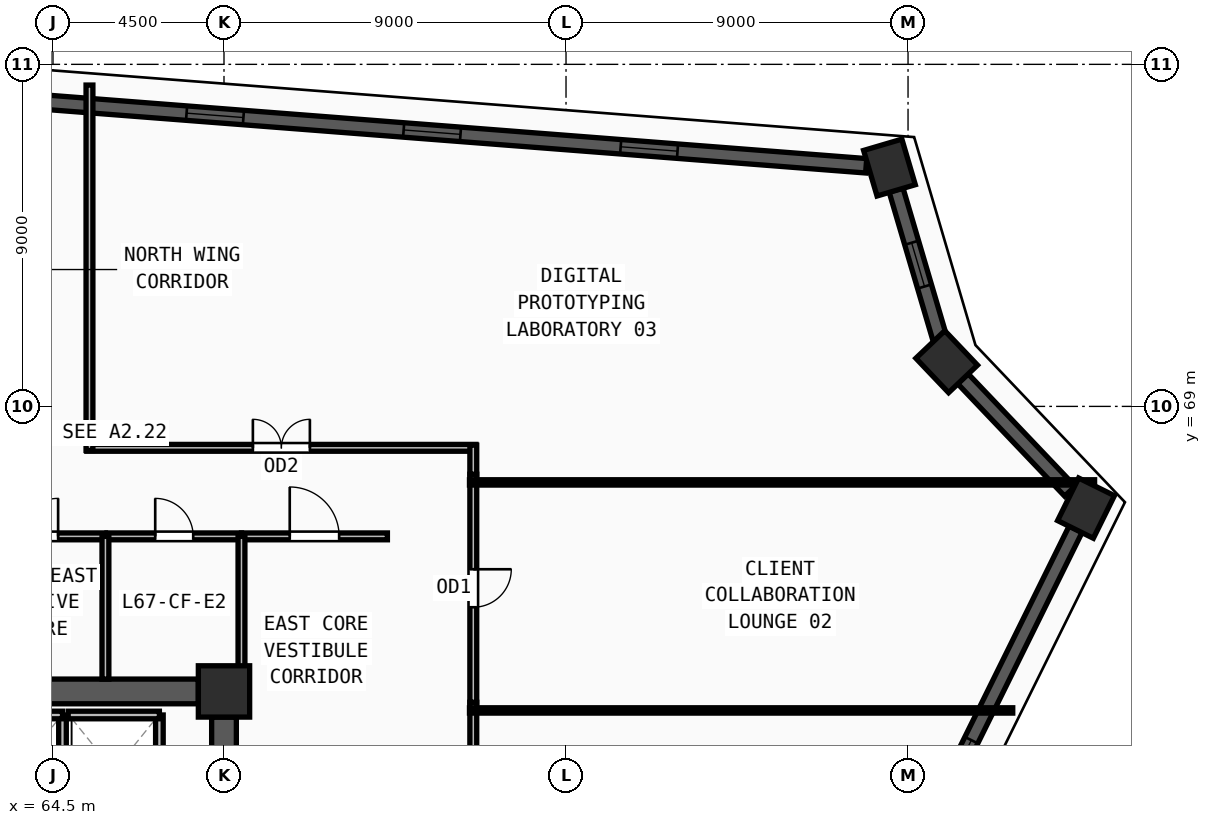
"""IFC4 building model, lengths in metres.
Left out: names, types, materials, properties, quantities, classifications, styles, units other than length and angle.
Written with IfcOpenShell. Run it as: python <this file> out.ifc"""

import sys

from ifc_helpers import new_model, si_unit, direction, frame, frame_2d, origin, origin_2d, place, context, subcontext, project, spatial, rectangle, extrude, source, transform, mapped, element, fill, save


model = new_model("IFC4")
c1 = context("Model", 3, precision=1e-05, world=origin(), true_north=direction((0.0, 1.0)))
c2 = subcontext(c1, "Body", "Model", "MODEL_VIEW")
j1 = project(units=[si_unit("LENGTHUNIT", "METRE"), si_unit("PLANEANGLEUNIT", "RADIAN")], contexts=[c1])
p1 = place(None, origin())
s1 = spatial("IfcSite", under=j1, at=p1, CompositionType="ELEMENT")
p2 = place(p1, origin())
s2 = spatial("IfcBuilding", under=s1, at=p2, CompositionType="ELEMENT")
p3 = place(p2, frame((0.0, 0.0, 258.75)))
s3 = spatial("IfcBuildingStorey", under=s2, at=p3, CompositionType="ELEMENT", Elevation=258.75)
m1 = source(origin(), c2, "Body", "SweptSolid", [
    extrude(rectangle(XDim=1.35, YDim=1.35, at=origin_2d()), origin(), (0.0, 0.0, 1.0), 3.75),
])
p4 = place(p3, frame((69.0, 61.5, 0.0), z_axis=(0.0, 0.0, 1.0), x_axis=(1.0, 0.0, 0.0)))
e1 = element("IfcColumn", 1, at=p4, inside=s3, PredefinedType="COLUMN", context=c2, shape_type="MappedRepresentation", body=[
    mapped(m1, transform((0.0, 0.0, 0.0), x_axis=(1.0, 0.0, 0.0), y_axis=(0.0, 1.0, 0.0), z_axis=(0.0, 0.0, 1.0), scale=1.0)),
])
m2 = source(origin(), c2, "Body", "SweptSolid", [
    extrude(rectangle(XDim=1.25, YDim=1.05, at=origin_2d()), origin(), (0.0, 0.0, 1.0), 3.75),
])
for number, where, z_axis, x_axis in (
    (2, (86.511, 75.284, 0.0), (0.0, 0.0, 1.0), (-0.283, 0.959, 0.0)),
    (3, (88.017, 70.176, 0.0), (0.0, 0.0, 1.0), (-0.689, 0.724, 0.0)),
    (4, (91.683, 66.323, 0.0), (0.0, 0.0, 1.0), (0.443, 0.896, 0.0)),
):
    element("IfcColumn", number, at=place(p3, frame(where, z_axis=z_axis, x_axis=x_axis)), inside=s3, PredefinedType="COLUMN", context=c2, shape_type="MappedRepresentation", body=[
        mapped(m2, transform((0.0, 0.0, 0.0), x_axis=(1.0, 0.0, 0.0), y_axis=(0.0, 1.0, 0.0), z_axis=(0.0, 0.0, 1.0), scale=1.0)),
    ])
p5 = place(p3, frame((79.1, 40.865, 0.0), z_axis=(0.0, 0.0, 1.0), x_axis=(0.44309993188, 0.896472225096, 0.0)))
e5 = element("IfcWall", 5, at=p5, inside=s3, PredefinedType="SOLIDWALL", context=c2, shape_type="SweptSolid", body=[
    extrude(rectangle(XDim=27.783, YDim=0.38, at=frame_2d((13.892, 0.0))), origin(), (0.0, 0.0, 1.0), 3.57),
])
m3 = source(origin(), c2, "Body", "SweptSolid", [
    extrude(rectangle(XDim=1.5, YDim=1.9, at=frame_2d((0.75, 0.95))), frame((0.0, 0.2, 0.0), z_axis=(0.0, -1.0, 0.0), x_axis=(1.0, 0.0, 0.0)), (0.0, 0.0, 1.0), 0.4),
])
p6 = place(p5, frame((6.196, 0.0, 0.55)))
e6 = element("IfcOpeningElement", 6, at=p6, cuts=e5, PredefinedType="OPENING", context=c2, shape_type="MappedRepresentation", body=[
    mapped(m3, transform((0.0, 0.0, 0.0), x_axis=(1.0, 0.0, 0.0), y_axis=(0.0, 1.0, 0.0), z_axis=(0.0, 0.0, 1.0), scale=1.0)),
])
p7 = place(p5, frame((13.992, 0.0, 0.55)))
e7 = element("IfcOpeningElement", 7, at=p7, cuts=e5, PredefinedType="OPENING", context=c2, shape_type="MappedRepresentation", body=[
    mapped(m3, transform((0.0, 0.0, 0.0), x_axis=(1.0, 0.0, 0.0), y_axis=(0.0, 1.0, 0.0), z_axis=(0.0, 0.0, 1.0), scale=1.0)),
])
p8 = place(p5, frame((20.088, 0.0, 0.55)))
e8 = element("IfcOpeningElement", 8, at=p8, cuts=e5, PredefinedType="OPENING", context=c2, shape_type="MappedRepresentation", body=[
    mapped(m3, transform((0.0, 0.0, 0.0), x_axis=(1.0, 0.0, 0.0), y_axis=(0.0, 1.0, 0.0), z_axis=(0.0, 0.0, 1.0), scale=1.0)),
])
p9 = place(p3, frame((91.259, 66.769, 0.0), z_axis=(0.0, 0.0, 1.0), x_axis=(-0.689420989275, 0.724360890404, 0.0)))
e9 = element("IfcWall", 9, at=p9, inside=s3, PredefinedType="SOLIDWALL", context=c2, shape_type="SweptSolid", body=[
    extrude(rectangle(XDim=4.088, YDim=0.38, at=frame_2d((2.044, 0.0))), origin(), (0.0, 0.0, 1.0), 3.57),
])
p10 = place(p3, frame((87.843, 70.766, 0.0), z_axis=(0.0, 0.0, 1.0), x_axis=(-0.282766622506, 0.95918873909, 0.0)))
e10 = element("IfcWall", 10, at=p10, inside=s3, PredefinedType="SOLIDWALL", context=c2, shape_type="SweptSolid", body=[
    extrude(rectangle(XDim=4.095, YDim=0.38, at=frame_2d((2.048, 0.0))), origin(), (0.0, 0.0, 1.0), 3.57),
])
m4 = source(origin(), c2, "Body", "SweptSolid", [
    extrude(rectangle(XDim=1.2, YDim=1.9, at=frame_2d((0.6, 0.95))), frame((0.0, 0.2, 0.0), z_axis=(0.0, -1.0, 0.0), x_axis=(1.0, 0.0, 0.0)), (0.0, 0.0, 1.0), 0.4),
])
p11 = place(p10, frame((1.448, 0.0, 0.55)))
e11 = element("IfcOpeningElement", 11, at=p11, cuts=e10, PredefinedType="OPENING", context=c2, shape_type="MappedRepresentation", body=[
    mapped(m4, transform((0.0, 0.0, 0.0), x_axis=(1.0, 0.0, 0.0), y_axis=(0.0, 1.0, 0.0), z_axis=(0.0, 0.0, 1.0), scale=1.0)),
])
p12 = place(p3, frame((85.898, 75.331, 0.0), z_axis=(0.0, 0.0, 1.0), x_axis=(-0.997012155609, 0.077244815801, 0.0)))
e12 = element("IfcWall", 12, at=p12, inside=s3, PredefinedType="SOLIDWALL", context=c2, shape_type="SweptSolid", body=[
    extrude(rectangle(XDim=22.914, YDim=0.38, at=frame_2d((11.457, 0.0))), origin(), (0.0, 0.0, 1.0), 3.57),
])
p13 = place(p12, frame((4.979, 0.0, 0.55)))
e13 = element("IfcOpeningElement", 13, at=p13, cuts=e12, PredefinedType="OPENING", context=c2, shape_type="MappedRepresentation", body=[
    mapped(m3, transform((0.0, 0.0, 0.0), x_axis=(1.0, 0.0, 0.0), y_axis=(0.0, 1.0, 0.0), z_axis=(0.0, 0.0, 1.0), scale=1.0)),
])
p14 = place(p12, frame((10.707, 0.0, 0.55)))
e14 = element("IfcOpeningElement", 14, at=p14, cuts=e12, PredefinedType="OPENING", context=c2, shape_type="MappedRepresentation", body=[
    mapped(m3, transform((0.0, 0.0, 0.0), x_axis=(1.0, 0.0, 0.0), y_axis=(0.0, 1.0, 0.0), z_axis=(0.0, 0.0, 1.0), scale=1.0)),
])
p15 = place(p12, frame((16.436, 0.0, 0.55)))
e15 = element("IfcOpeningElement", 15, at=p15, cuts=e12, PredefinedType="OPENING", context=c2, shape_type="MappedRepresentation", body=[
    mapped(m3, transform((0.0, 0.0, 0.0), x_axis=(1.0, 0.0, 0.0), y_axis=(0.0, 1.0, 0.0), z_axis=(0.0, 0.0, 1.0), scale=1.0)),
])
p16 = place(p3, frame((60.675, 61.5, 0.0), z_axis=(0.0, 0.0, 1.0), x_axis=(1.0, 0.0, 0.0)))
e16 = element("IfcWall", 16, at=p16, inside=s3, PredefinedType="SHEAR", context=c2, shape_type="SweptSolid", body=[
    extrude(rectangle(XDim=7.65, YDim=0.65, at=frame_2d((3.825, 0.0))), origin(), (0.0, 0.0, 1.0), 3.57),
])
p17 = place(p3, frame((69.0, 60.825, 0.0), z_axis=(0.0, 0.0, 1.0), x_axis=(0.0, -1.0, 0.0)))
e17 = element("IfcWall", 17, at=p17, inside=s3, PredefinedType="SHEAR", context=c2, shape_type="SweptSolid", body=[
    extrude(rectangle(XDim=13.65, YDim=0.65, at=frame_2d((6.825, 0.0))), origin(), (0.0, 0.0, 1.0), 3.57),
])
m5 = source(origin(), c2, "Body", "SweptSolid", [
    extrude(rectangle(XDim=1.2, YDim=2.2, at=frame_2d((0.6, 1.1))), frame((0.0, 0.335, 0.0), z_axis=(0.0, -1.0, 0.0), x_axis=(1.0, 0.0, 0.0)), (0.0, 0.0, 1.0), 0.67),
])
p18 = place(p17, frame((1.275, 0.0, 0.0)))
e18 = element("IfcOpeningElement", 18, at=p18, cuts=e17, PredefinedType="OPENING", context=c2, shape_type="MappedRepresentation", body=[
    mapped(m5, transform((0.0, 0.0, 0.0), x_axis=(1.0, 0.0, 0.0), y_axis=(0.0, 1.0, 0.0), z_axis=(0.0, 0.0, 1.0), scale=1.0)),
])
p19 = place(p3, frame((64.75, 57.95, 0.0), z_axis=(0.0, 0.0, 1.0), x_axis=(0.0, 1.0, 0.0)))
e19 = element("IfcWall", 19, at=p19, inside=s3, PredefinedType="SOLIDWALL", context=c2, shape_type="SweptSolid", body=[
    extrude(rectangle(XDim=2.93, YDim=0.2, at=frame_2d((1.465, 0.0))), origin(), (0.0, 0.0, 1.0), 3.57),
])
p20 = place(p3, frame((64.75, 60.88, 0.0), z_axis=(0.0, 0.0, 1.0), x_axis=(-1.0, 0.0, 0.0)))
e20 = element("IfcWall", 20, at=p20, inside=s3, PredefinedType="SOLIDWALL", context=c2, shape_type="SweptSolid", body=[
    extrude(rectangle(XDim=2.4, YDim=0.2, at=frame_2d((1.2, 0.0))), origin(), (0.0, 0.0, 1.0), 3.57),
])
p21 = place(p3, frame((67.3, 57.95, 0.0), z_axis=(0.0, 0.0, 1.0), x_axis=(0.0, 1.0, 0.0)))
e21 = element("IfcWall", 21, at=p21, inside=s3, PredefinedType="SOLIDWALL", context=c2, shape_type="SweptSolid", body=[
    extrude(rectangle(XDim=2.93, YDim=0.2, at=frame_2d((1.465, 0.0))), origin(), (0.0, 0.0, 1.0), 3.57),
])
p22 = place(p3, frame((67.3, 60.88, 0.0), z_axis=(0.0, 0.0, 1.0), x_axis=(-1.0, 0.0, 0.0)))
e22 = element("IfcWall", 22, at=p22, inside=s3, PredefinedType="SOLIDWALL", context=c2, shape_type="SweptSolid", body=[
    extrude(rectangle(XDim=2.4, YDim=0.2, at=frame_2d((1.2, 0.0))), origin(), (0.0, 0.0, 1.0), 3.57),
])
p23 = place(p3, frame((62.39, 65.58, 0.0), z_axis=(0.0, 0.0, 1.0), x_axis=(1.0, 0.0, 0.0)))
e23 = element("IfcWall", 23, at=p23, inside=s3, PredefinedType="PARTITIONING", context=c2, shape_type="SweptSolid", body=[
    extrude(rectangle(XDim=3.49, YDim=0.18, at=frame_2d((1.745, 0.0))), origin(), (0.0, 0.0, 1.0), 3.57),
])
m6 = source(origin(), c2, "Body", "SweptSolid", [
    extrude(rectangle(XDim=1.0, YDim=2.2, at=frame_2d((0.5, 1.1))), frame((0.0, 0.1, 0.0), z_axis=(0.0, -1.0, 0.0), x_axis=(1.0, 0.0, 0.0)), (0.0, 0.0, 1.0), 0.2),
])
p24 = place(p23, frame((1.245, 0.0, 0.0)))
e24 = element("IfcOpeningElement", 24, at=p24, cuts=e23, PredefinedType="OPENING", context=c2, shape_type="MappedRepresentation", body=[
    mapped(m6, transform((0.0, 0.0, 0.0), x_axis=(1.0, 0.0, 0.0), y_axis=(0.0, 1.0, 0.0), z_axis=(0.0, 0.0, 1.0), scale=1.0)),
])
p25 = place(p3, frame((65.92, 65.58, 0.0), z_axis=(0.0, 0.0, 1.0), x_axis=(1.0, 0.0, 0.0)))
e25 = element("IfcWall", 25, at=p25, inside=s3, PredefinedType="PARTITIONING", context=c2, shape_type="SweptSolid", body=[
    extrude(rectangle(XDim=3.54, YDim=0.18, at=frame_2d((1.77, 0.0))), origin(), (0.0, 0.0, 1.0), 3.57),
])
p26 = place(p25, frame((1.27, 0.0, 0.0)))
e26 = element("IfcOpeningElement", 26, at=p26, cuts=e25, PredefinedType="OPENING", context=c2, shape_type="MappedRepresentation", body=[
    mapped(m6, transform((0.0, 0.0, 0.0), x_axis=(1.0, 0.0, 0.0), y_axis=(0.0, 1.0, 0.0), z_axis=(0.0, 0.0, 1.0), scale=1.0)),
])
p27 = place(p3, frame((69.46, 65.58, 0.0), z_axis=(0.0, 0.0, 1.0), x_axis=(1.0, 0.0, 0.0)))
e27 = element("IfcWall", 27, at=p27, inside=s3, PredefinedType="PARTITIONING", context=c2, shape_type="SweptSolid", body=[
    extrude(rectangle(XDim=3.84, YDim=0.18, at=frame_2d((1.92, 0.0))), origin(), (0.0, 0.0, 1.0), 3.57),
])
m7 = source(origin(), c2, "Body", "SweptSolid", [
    extrude(rectangle(XDim=1.3, YDim=2.2, at=frame_2d((0.65, 1.1))), frame((0.0, 0.1, 0.0), z_axis=(0.0, -1.0, 0.0), x_axis=(1.0, 0.0, 0.0)), (0.0, 0.0, 1.0), 0.2),
])
p28 = place(p27, frame((1.27, 0.0, 0.0)))
e28 = element("IfcOpeningElement", 28, at=p28, cuts=e27, PredefinedType="OPENING", context=c2, shape_type="MappedRepresentation", body=[
    mapped(m7, transform((0.0, 0.0, 0.0), x_axis=(1.0, 0.0, 0.0), y_axis=(0.0, 1.0, 0.0), z_axis=(0.0, 0.0, 1.0), scale=1.0)),
])
p29 = place(p3, frame((75.56, 61.215, 0.0), z_axis=(0.0, 0.0, 1.0), x_axis=(0.0, -1.0, 0.0)))
e29 = element("IfcWall", 29, at=p29, inside=s3, PredefinedType="PARTITIONING", context=c2, shape_type="SweptSolid", body=[
    extrude(rectangle(XDim=8.93, YDim=0.18, at=frame_2d((4.465, 0.0))), origin(), (0.0, 0.0, 1.0), 3.57),
])
p30 = place(p29, frame((3.965, 0.0, 0.0)))
e30 = element("IfcOpeningElement", 30, at=p30, cuts=e29, PredefinedType="OPENING", context=c2, shape_type="MappedRepresentation", body=[
    mapped(m6, transform((0.0, 0.0, 0.0), x_axis=(1.0, 0.0, 0.0), y_axis=(0.0, 1.0, 0.0), z_axis=(0.0, 0.0, 1.0), scale=1.0)),
])
p31 = place(p3, frame((75.56, 67.215, 0.0), z_axis=(0.0, 0.0, 1.0), x_axis=(0.0, -1.0, 0.0)))
e31 = element("IfcWall", 31, at=p31, inside=s3, PredefinedType="PARTITIONING", context=c2, shape_type="SweptSolid", body=[
    extrude(rectangle(XDim=6.0, YDim=0.18, at=frame_2d((3.0, 0.0))), origin(), (0.0, 0.0, 1.0), 3.57),
])
p32 = place(p31, frame((2.5, 0.0, 0.0)))
e32 = element("IfcOpeningElement", 32, at=p32, cuts=e31, PredefinedType="OPENING", context=c2, shape_type="MappedRepresentation", body=[
    mapped(m6, transform((0.0, 0.0, 0.0), x_axis=(1.0, 0.0, 0.0), y_axis=(0.0, 1.0, 0.0), z_axis=(0.0, 0.0, 1.0), scale=1.0)),
])
p33 = place(p3, frame((65.39, 67.91, 0.0), z_axis=(0.0, 0.0, 1.0), x_axis=(1.0, 0.0, 0.0)))
e33 = element("IfcWall", 33, at=p33, inside=s3, PredefinedType="PARTITIONING", context=c2, shape_type="SweptSolid", body=[
    extrude(rectangle(XDim=10.24, YDim=0.18, at=frame_2d((5.12, 0.0))), origin(), (0.0, 0.0, 1.0), 3.205),
])
m8 = source(origin(), c2, "Body", "SweptSolid", [
    extrude(rectangle(XDim=1.5, YDim=2.2, at=frame_2d((0.75, 1.1))), frame((0.0, 0.1, 0.0), z_axis=(0.0, -1.0, 0.0), x_axis=(1.0, 0.0, 0.0)), (0.0, 0.0, 1.0), 0.2),
])
p34 = place(p33, frame((4.37, 0.0, 0.0)))
e34 = element("IfcOpeningElement", 34, at=p34, cuts=e33, PredefinedType="OPENING", context=c2, shape_type="MappedRepresentation", body=[
    mapped(m8, transform((0.0, 0.0, 0.0), x_axis=(1.0, 0.0, 0.0), y_axis=(0.0, 1.0, 0.0), z_axis=(0.0, 0.0, 1.0), scale=1.0)),
])
p35 = place(p3, frame((65.88, 61.825, 0.0), z_axis=(0.0, 0.0, 1.0), x_axis=(0.0, 1.0, 0.0)))
e35 = element("IfcWall", 35, at=p35, inside=s3, PredefinedType="PARTITIONING", context=c2, shape_type="SweptSolid", body=[
    extrude(rectangle(XDim=3.755, YDim=0.18, at=frame_2d((1.877, 0.0))), origin(), (0.0, 0.0, 1.0), 3.57),
])
p36 = place(p3, frame((69.46, 61.95, 0.0), z_axis=(0.0, 0.0, 1.0), x_axis=(0.0, 1.0, 0.0)))
e36 = element("IfcWall", 36, at=p36, inside=s3, PredefinedType="PARTITIONING", context=c2, shape_type="SweptSolid", body=[
    extrude(rectangle(XDim=3.63, YDim=0.18, at=frame_2d((1.815, 0.0))), origin(), (0.0, 0.0, 1.0), 3.57),
])
p37 = place(p3, frame((65.46, 77.455, 0.0), z_axis=(0.0, 0.0, 1.0), x_axis=(0.0, -1.0, 0.0)))
e37 = element("IfcWall", 37, at=p37, inside=s3, PredefinedType="PARTITIONING", context=c2, shape_type="SweptSolid", body=[
    extrude(rectangle(XDim=9.615, YDim=0.18, at=frame_2d((4.808, 0.0))), origin(), (0.0, 0.0, 1.0), 3.57),
])
p38 = place(p3, frame((75.56, 67.98, 0.0), z_axis=(0.0, 0.0, 1.0), x_axis=(0.0, -1.0, 0.0)))
e38 = element("IfcWall", 38, at=p38, inside=s3, PredefinedType="PARTITIONING", context=c2, shape_type="SweptSolid", body=[
    extrude(rectangle(XDim=0.765, YDim=0.18, at=frame_2d((0.382, 0.0))), origin(), (0.0, 0.0, 1.0), 3.57),
])
p39 = place(p3, frame((75.46, 61.0, 0.0), z_axis=(0.0, 0.0, 1.0), x_axis=(1.0, 0.0, 0.0)))
e39 = element("IfcWall", 39, at=p39, inside=s3, PredefinedType="PARTITIONING", context=c2, shape_type="SweptSolid", body=[
    extrude(rectangle(XDim=14.295, YDim=0.14, at=frame_2d((7.147, 0.0))), origin(), (0.0, 0.0, 1.0), 3.57),
])
p40 = place(p3, frame((75.46, 67.0, 0.0), z_axis=(0.0, 0.0, 1.0), x_axis=(1.0, 0.0, 0.0)))
e40 = element("IfcWall", 40, at=p40, inside=s3, PredefinedType="PARTITIONING", context=c2, shape_type="SweptSolid", body=[
    extrude(rectangle(XDim=16.449, YDim=0.14, at=frame_2d((8.225, 0.0))), origin(), (0.0, 0.0, 1.0), 3.57),
])
m9 = source(origin(), c2, "Body", "SweptSolid", [
    extrude(rectangle(XDim=1.5, YDim=1.9, at=frame_2d((0.75, 0.95))), frame((0.0, 0.03, 0.0), z_axis=(0.0, -1.0, 0.0), x_axis=(1.0, 0.0, 0.0)), (0.0, 0.0, 1.0), 0.06),
])
p41 = place(p8, origin())
e41 = element("IfcWindow", 41, at=p41, inside=s3, PartitioningType="DOUBLE_PANEL_VERTICAL", PredefinedType="WINDOW", context=c2, shape_type="MappedRepresentation", body=[
    mapped(m9, transform((0.0, 0.0, 0.0), x_axis=(1.0, 0.0, 0.0), y_axis=(0.0, 1.0, 0.0), z_axis=(0.0, 0.0, 1.0), scale=1.0)),
])
fill(e8, e41)
m10 = source(origin(), c2, "Body", "SweptSolid", [
    extrude(rectangle(XDim=1.2, YDim=1.9, at=frame_2d((0.6, 0.95))), frame((0.0, 0.03, 0.0), z_axis=(0.0, -1.0, 0.0), x_axis=(1.0, 0.0, 0.0)), (0.0, 0.0, 1.0), 0.06),
])
p42 = place(p11, origin())
e42 = element("IfcWindow", 42, at=p42, inside=s3, PartitioningType="SINGLE_PANEL", PredefinedType="WINDOW", context=c2, shape_type="MappedRepresentation", body=[
    mapped(m10, transform((0.0, 0.0, 0.0), x_axis=(1.0, 0.0, 0.0), y_axis=(0.0, 1.0, 0.0), z_axis=(0.0, 0.0, 1.0), scale=1.0)),
])
fill(e11, e42)
p43 = place(p13, origin())
e43 = element("IfcWindow", 43, at=p43, inside=s3, PartitioningType="DOUBLE_PANEL_VERTICAL", PredefinedType="WINDOW", context=c2, shape_type="MappedRepresentation", body=[
    mapped(m9, transform((0.0, 0.0, 0.0), x_axis=(1.0, 0.0, 0.0), y_axis=(0.0, 1.0, 0.0), z_axis=(0.0, 0.0, 1.0), scale=1.0)),
])
fill(e13, e43)
p44 = place(p14, origin())
e44 = element("IfcWindow", 44, at=p44, inside=s3, PartitioningType="DOUBLE_PANEL_VERTICAL", PredefinedType="WINDOW", context=c2, shape_type="MappedRepresentation", body=[
    mapped(m9, transform((0.0, 0.0, 0.0), x_axis=(1.0, 0.0, 0.0), y_axis=(0.0, 1.0, 0.0), z_axis=(0.0, 0.0, 1.0), scale=1.0)),
])
fill(e14, e44)
p45 = place(p15, origin())
e45 = element("IfcWindow", 45, at=p45, inside=s3, PartitioningType="DOUBLE_PANEL_VERTICAL", PredefinedType="WINDOW", context=c2, shape_type="MappedRepresentation", body=[
    mapped(m9, transform((0.0, 0.0, 0.0), x_axis=(1.0, 0.0, 0.0), y_axis=(0.0, 1.0, 0.0), z_axis=(0.0, 0.0, 1.0), scale=1.0)),
])
fill(e15, e45)
m11 = source(origin(), c2, "Body", "SweptSolid", [
    extrude(rectangle(XDim=1.0, YDim=2.2, at=frame_2d((0.5, 1.1))), frame((0.0, 0.025, 0.0), z_axis=(0.0, -1.0, 0.0), x_axis=(1.0, 0.0, 0.0)), (0.0, 0.0, 1.0), 0.05),
])
p46 = place(p24, origin())
e46 = element("IfcDoor", 46, at=p46, inside=s3, OperationType="SINGLE_SWING_RIGHT", PredefinedType="DOOR", context=c2, shape_type="MappedRepresentation", body=[
    mapped(m11, transform((0.0, 0.0, 0.0), x_axis=(1.0, 0.0, 0.0), y_axis=(0.0, 1.0, 0.0), z_axis=(0.0, 0.0, 1.0), scale=1.0)),
])
fill(e24, e46)
p47 = place(p26, origin())
e47 = element("IfcDoor", 47, at=p47, inside=s3, OperationType="SINGLE_SWING_LEFT", PredefinedType="DOOR", context=c2, shape_type="MappedRepresentation", body=[
    mapped(m11, transform((0.0, 0.0, 0.0), x_axis=(1.0, 0.0, 0.0), y_axis=(0.0, 1.0, 0.0), z_axis=(0.0, 0.0, 1.0), scale=1.0)),
])
fill(e26, e47)
m12 = source(origin(), c2, "Body", "SweptSolid", [
    extrude(rectangle(XDim=1.3, YDim=2.2, at=frame_2d((0.65, 1.1))), frame((0.0, 0.025, 0.0), z_axis=(0.0, -1.0, 0.0), x_axis=(1.0, 0.0, 0.0)), (0.0, 0.0, 1.0), 0.05),
])
p48 = place(p28, origin())
e48 = element("IfcDoor", 48, at=p48, inside=s3, OperationType="SINGLE_SWING_LEFT", PredefinedType="DOOR", context=c2, shape_type="MappedRepresentation", body=[
    mapped(m12, transform((0.0, 0.0, 0.0), x_axis=(1.0, 0.0, 0.0), y_axis=(0.0, 1.0, 0.0), z_axis=(0.0, 0.0, 1.0), scale=1.0)),
])
fill(e28, e48)
p49 = place(p32, origin())
e49 = element("IfcDoor", 49, at=p49, inside=s3, OperationType="SINGLE_SWING_LEFT", PredefinedType="DOOR", context=c2, shape_type="MappedRepresentation", body=[
    mapped(m11, transform((0.0, 0.0, 0.0), x_axis=(1.0, 0.0, 0.0), y_axis=(0.0, 1.0, 0.0), z_axis=(0.0, 0.0, 1.0), scale=1.0)),
])
fill(e32, e49)
m13 = source(origin(), c2, "Body", "SweptSolid", [
    extrude(rectangle(XDim=1.5, YDim=2.2, at=frame_2d((0.75, 1.1))), frame((0.0, 0.025, 0.0), z_axis=(0.0, -1.0, 0.0), x_axis=(1.0, 0.0, 0.0)), (0.0, 0.0, 1.0), 0.05),
])
p50 = place(p34, origin())
e50 = element("IfcDoor", 50, at=p50, inside=s3, OperationType="DOUBLE_DOOR_SINGLE_SWING", PredefinedType="DOOR", context=c2, shape_type="MappedRepresentation", body=[
    mapped(m13, transform((0.0, 0.0, 0.0), x_axis=(1.0, 0.0, 0.0), y_axis=(0.0, 1.0, 0.0), z_axis=(0.0, 0.0, 1.0), scale=1.0)),
])
fill(e34, e50)
save(model, sys.argv[1])
